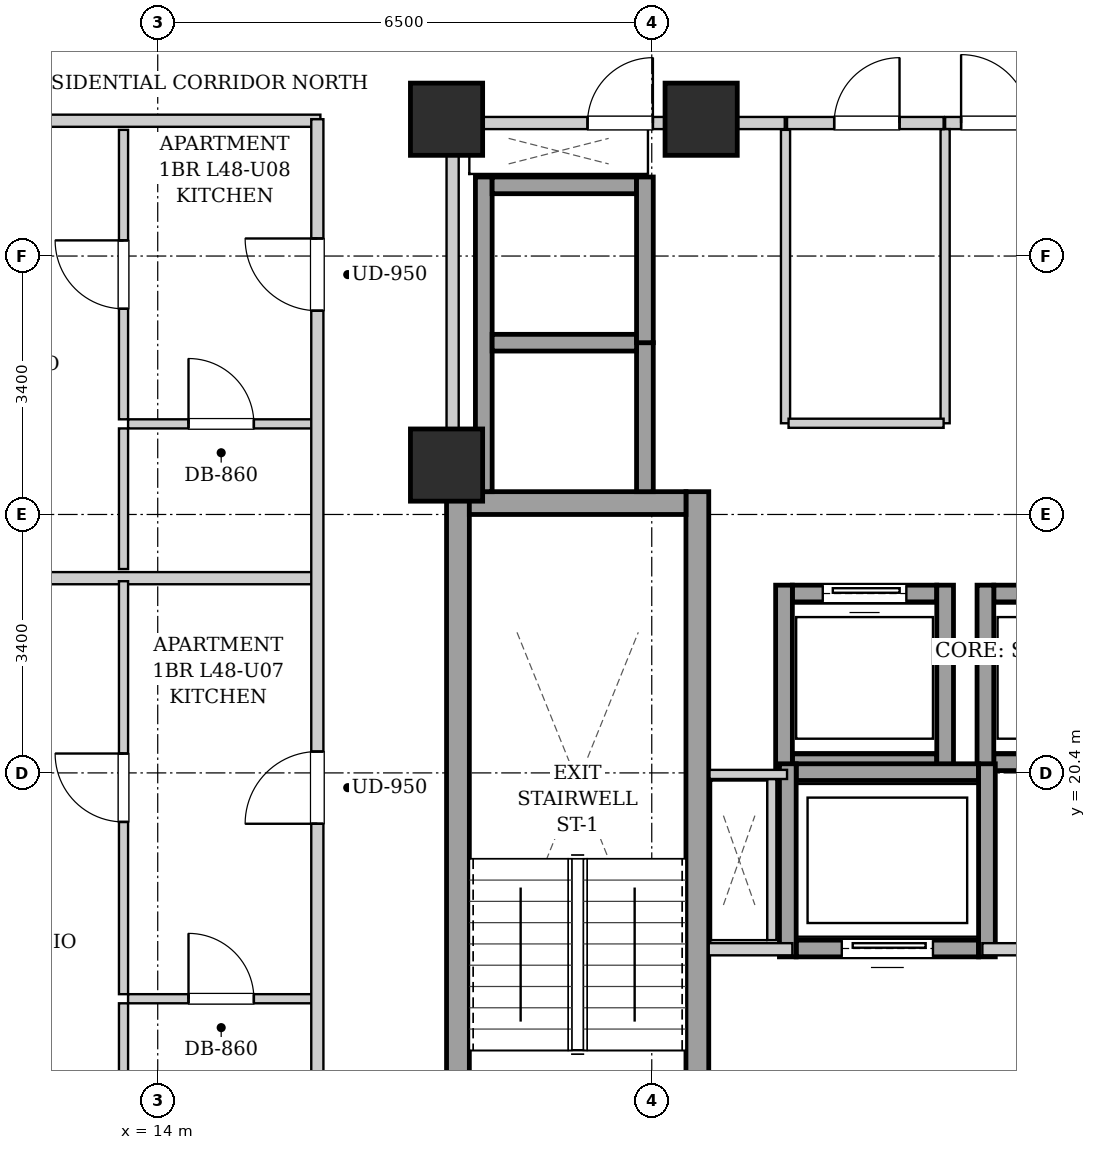
"""IFC4 building model, lengths in metres.
Left out: names, types, materials, properties, quantities, classifications, styles, units other than length and angle.
Written with IfcOpenShell. Run it as: python <this file> out.ifc"""

import sys

from ifc_helpers import new_model, si_unit, direction, frame, frame_2d, origin, origin_2d, place, context, subcontext, project, spatial, rectangle, extrude, element, fill, save


model = new_model("IFC4")
c1 = context("Model", 3, precision=1e-05, world=origin(), true_north=direction((0.0, 1.0)))
c2 = subcontext(c1, "Body", "Model", "MODEL_VIEW")
j1 = project(units=[si_unit("LENGTHUNIT", "METRE"), si_unit("PLANEANGLEUNIT", "RADIAN")], contexts=[c1])
p1 = place(None, origin())
s1 = spatial("IfcSite", under=j1, at=p1, CompositionType="ELEMENT")
p2 = place(p1, origin())
s2 = spatial("IfcBuilding", under=s1, at=p2, CompositionType="ELEMENT")
p3 = place(p2, frame((0.0, 0.0, 166.65)))
s3 = spatial("IfcBuildingStorey", under=s2, at=p3, CompositionType="ELEMENT", Elevation=166.65)
for number, where, z_axis, x_axis in (
    (1, (17.8, 29.0, 0.0), (0.0, 0.0, 1.0), (1.0, 0.0, 0.0)),
    (2, (21.15, 29.0, 0.0), (0.0, 0.0, 1.0), (1.0, 0.0, 0.0)),
    (3, (17.8, 24.45, 0.0), (0.0, 0.0, 1.0), (1.0, 0.0, 0.0)),
):
    element("IfcColumn", number, at=place(p3, frame(where, z_axis=z_axis, x_axis=x_axis)), inside=s3, PredefinedType="COLUMN", context=c2, shape_type="SweptSolid", body=[
        extrude(rectangle(XDim=0.95, YDim=0.95, at=origin_2d()), origin(), (0.0, 0.0, 1.0), 3.25),
    ])
for number, where, z_axis, x_axis in (
    (4, (17.95, 15.1, 0.0), (0.0, 0.0, 1.0), (0.0, 1.0, 0.0)),
    (5, (21.1, 15.1, 0.0), (0.0, 0.0, 1.0), (0.0, 1.0, 0.0)),
):
    element("IfcWall", number, at=place(p3, frame(where, z_axis=z_axis, x_axis=x_axis)), inside=s3, PredefinedType="SHEAR", context=c2, shape_type="SweptSolid", body=[
        extrude(rectangle(XDim=9.0, YDim=0.3, at=frame_2d((4.5, 0.0))), origin(), (0.0, 0.0, 1.0), 2.93),
    ])
p4 = place(p3, frame((18.1, 23.95, 0.0), z_axis=(0.0, 0.0, 1.0), x_axis=(1.0, 0.0, 0.0)))
e6 = element("IfcWall", 6, at=p4, inside=s3, PredefinedType="SHEAR", context=c2, shape_type="SweptSolid", body=[
    extrude(rectangle(XDim=2.85, YDim=0.3, at=frame_2d((1.425, 0.0))), origin(), (0.0, 0.0, 1.0), 2.93),
])
p5 = place(p3, frame((22.35, 20.54, 0.0), z_axis=(0.0, 0.0, 1.0), x_axis=(1.0, 0.0, 0.0)))
e7 = element("IfcWall", 7, at=p5, inside=s3, PredefinedType="SHEAR", context=c2, shape_type="SweptSolid", body=[
    extrude(rectangle(XDim=1.9, YDim=0.22, at=frame_2d((0.95, 0.0))), origin(), (0.0, 0.0, 1.0), 2.93),
])
p6 = place(p3, frame((22.35, 22.76, 0.0), z_axis=(0.0, 0.0, 1.0), x_axis=(1.0, 0.0, 0.0)))
e8 = element("IfcWall", 8, at=p6, inside=s3, PredefinedType="SHEAR", context=c2, shape_type="SweptSolid", body=[
    extrude(rectangle(XDim=1.9, YDim=0.22, at=frame_2d((0.95, 0.0))), origin(), (0.0, 0.0, 1.0), 2.93),
])
p7 = place(p6, frame((0.4, 0.0, 0.0)))
e9 = element("IfcOpeningElement", 9, at=p7, cuts=e8, PredefinedType="OPENING", context=c2, shape_type="SweptSolid", body=[
    extrude(rectangle(XDim=1.1, YDim=2.15, at=frame_2d((0.55, 1.075))), frame((0.0, 0.12, 0.0), z_axis=(0.0, -1.0, 0.0), x_axis=(1.0, 0.0, 0.0)), (0.0, 0.0, 1.0), 0.24),
])
for number, where, z_axis, x_axis in (
    (10, (22.24, 20.43, 0.0), (0.0, 0.0, 1.0), (0.0, 1.0, 0.0)),
    (11, (24.36, 20.43, 0.0), (0.0, 0.0, 1.0), (0.0, 1.0, 0.0)),
):
    element("IfcWall", number, at=place(p3, frame(where, z_axis=z_axis, x_axis=x_axis)), inside=s3, PredefinedType="SHEAR", context=c2, shape_type="SweptSolid", body=[
        extrude(rectangle(XDim=2.44, YDim=0.22, at=frame_2d((1.22, 0.0))), origin(), (0.0, 0.0, 1.0), 2.93),
    ])
p8 = place(p3, frame((25.0, 20.54, 0.0), z_axis=(0.0, 0.0, 1.0), x_axis=(1.0, 0.0, 0.0)))
e12 = element("IfcWall", 12, at=p8, inside=s3, PredefinedType="SHEAR", context=c2, shape_type="SweptSolid", body=[
    extrude(rectangle(XDim=1.9, YDim=0.22, at=frame_2d((0.95, 0.0))), origin(), (0.0, 0.0, 1.0), 2.93),
])
p9 = place(p3, frame((25.0, 22.76, 0.0), z_axis=(0.0, 0.0, 1.0), x_axis=(1.0, 0.0, 0.0)))
e13 = element("IfcWall", 13, at=p9, inside=s3, PredefinedType="SHEAR", context=c2, shape_type="SweptSolid", body=[
    extrude(rectangle(XDim=1.9, YDim=0.22, at=frame_2d((0.95, 0.0))), origin(), (0.0, 0.0, 1.0), 2.93),
])
p10 = place(p9, frame((0.4, 0.0, 0.0)))
e14 = element("IfcOpeningElement", 14, at=p10, cuts=e13, PredefinedType="OPENING", context=c2, shape_type="SweptSolid", body=[
    extrude(rectangle(XDim=1.1, YDim=2.15, at=frame_2d((0.55, 1.075))), frame((0.0, 0.12, 0.0), z_axis=(0.0, -1.0, 0.0), x_axis=(1.0, 0.0, 0.0)), (0.0, 0.0, 1.0), 0.24),
])
p11 = place(p3, frame((24.89, 20.43, 0.0), z_axis=(0.0, 0.0, 1.0), x_axis=(0.0, 1.0, 0.0)))
e15 = element("IfcWall", 15, at=p11, inside=s3, PredefinedType="SHEAR", context=c2, shape_type="SweptSolid", body=[
    extrude(rectangle(XDim=2.44, YDim=0.22, at=frame_2d((1.22, 0.0))), origin(), (0.0, 0.0, 1.0), 2.93),
])
p12 = place(p3, frame((18.29, 24.1, 0.0), z_axis=(0.0, 0.0, 1.0), x_axis=(0.0, 1.0, 0.0)))
e16 = element("IfcWall", 16, at=p12, inside=s3, PredefinedType="SHEAR", context=c2, shape_type="SweptSolid", body=[
    extrude(rectangle(XDim=4.14, YDim=0.22, at=frame_2d((2.07, 0.0))), origin(), (0.0, 0.0, 1.0), 2.93),
])
p13 = place(p3, frame((20.41, 24.1, 0.0), z_axis=(0.0, 0.0, 1.0), x_axis=(0.0, 1.0, 0.0)))
e17 = element("IfcWall", 17, at=p13, inside=s3, PredefinedType="SHEAR", context=c2, shape_type="SweptSolid", body=[
    extrude(rectangle(XDim=1.96, YDim=0.22, at=frame_2d((0.98, 0.0))), origin(), (0.0, 0.0, 1.0), 2.93),
])
for number, where, z_axis, x_axis in (
    (18, (18.4, 26.06, 0.0), (0.0, 0.0, 1.0), (1.0, 0.0, 0.0)),
    (19, (18.4, 28.13, 0.0), (0.0, 0.0, 1.0), (1.0, 0.0, 0.0)),
):
    element("IfcWall", number, at=place(p3, frame(where, z_axis=z_axis, x_axis=x_axis)), inside=s3, PredefinedType="SHEAR", context=c2, shape_type="SweptSolid", body=[
        extrude(rectangle(XDim=1.9, YDim=0.22, at=frame_2d((0.95, 0.0))), origin(), (0.0, 0.0, 1.0), 2.93),
    ])
p14 = place(p3, frame((20.41, 26.06, 0.0), z_axis=(0.0, 0.0, 1.0), x_axis=(0.0, 1.0, 0.0)))
e20 = element("IfcWall", 20, at=p14, inside=s3, PredefinedType="SHEAR", context=c2, shape_type="SweptSolid", body=[
    extrude(rectangle(XDim=2.18, YDim=0.22, at=frame_2d((1.09, 0.0))), origin(), (0.0, 0.0, 1.0), 2.93),
])
p15 = place(p3, frame((22.4, 18.09, 0.0), z_axis=(0.0, 0.0, 1.0), x_axis=(1.0, 0.0, 0.0)))
e21 = element("IfcWall", 21, at=p15, inside=s3, PredefinedType="SHEAR", context=c2, shape_type="SweptSolid", body=[
    extrude(rectangle(XDim=2.4, YDim=0.22, at=frame_2d((1.2, 0.0))), origin(), (0.0, 0.0, 1.0), 2.93),
])
p16 = place(p15, frame((0.6, 0.0, 0.0)))
e22 = element("IfcOpeningElement", 22, at=p16, cuts=e21, PredefinedType="OPENING", context=c2, shape_type="SweptSolid", body=[
    extrude(rectangle(XDim=1.2, YDim=2.15, at=frame_2d((0.6, 1.075))), frame((0.0, 0.12, 0.0), z_axis=(0.0, -1.0, 0.0), x_axis=(1.0, 0.0, 0.0)), (0.0, 0.0, 1.0), 0.24),
])
p17 = place(p3, frame((22.4, 20.41, 0.0), z_axis=(0.0, 0.0, 1.0), x_axis=(1.0, 0.0, 0.0)))
e23 = element("IfcWall", 23, at=p17, inside=s3, PredefinedType="SHEAR", context=c2, shape_type="SweptSolid", body=[
    extrude(rectangle(XDim=2.4, YDim=0.22, at=frame_2d((1.2, 0.0))), origin(), (0.0, 0.0, 1.0), 2.93),
])
for number, where, z_axis, x_axis in (
    (24, (22.29, 17.98, 0.0), (0.0, 0.0, 1.0), (0.0, 1.0, 0.0)),
    (25, (24.91, 17.98, 0.0), (0.0, 0.0, 1.0), (0.0, 1.0, 0.0)),
):
    element("IfcWall", number, at=place(p3, frame(where, z_axis=z_axis, x_axis=x_axis)), inside=s3, PredefinedType="SHEAR", context=c2, shape_type="SweptSolid", body=[
        extrude(rectangle(XDim=2.54, YDim=0.22, at=frame_2d((1.27, 0.0))), origin(), (0.0, 0.0, 1.0), 2.93),
    ])
p18 = place(p3, frame((21.25, 18.08, 0.0), z_axis=(0.0, 0.0, 1.0), x_axis=(1.0, 0.0, 0.0)))
e26 = element("IfcWall", 26, at=p18, inside=s3, PredefinedType="PARTITIONING", context=c2, shape_type="SweptSolid", body=[
    extrude(rectangle(XDim=1.1, YDim=0.16, at=frame_2d((0.55, 0.0))), origin(), (0.0, 0.0, 1.0), 2.93),
])
p19 = place(p3, frame((24.85, 18.08, 0.0), z_axis=(0.0, 0.0, 1.0), x_axis=(1.0, 0.0, 0.0)))
e27 = element("IfcWall", 27, at=p19, inside=s3, PredefinedType="PARTITIONING", context=c2, shape_type="SweptSolid", body=[
    extrude(rectangle(XDim=1.3, YDim=0.16, at=frame_2d((0.65, 0.0))), origin(), (0.0, 0.0, 1.0), 2.93),
])
p20 = place(p3, frame((17.88, 24.12, 0.0), z_axis=(0.0, 0.0, 1.0), x_axis=(0.0, 1.0, 0.0)))
e28 = element("IfcWall", 28, at=p20, inside=s3, PredefinedType="PARTITIONING", context=c2, shape_type="SweptSolid", body=[
    extrude(rectangle(XDim=4.76, YDim=0.16, at=frame_2d((2.38, 0.0))), origin(), (0.0, 0.0, 1.0), 2.265),
])
p21 = place(p3, frame((24.36, 28.95, 0.0), z_axis=(0.0, 0.0, 1.0), x_axis=(1.0, 0.0, 0.0)))
e29 = element("IfcWall", 29, at=p21, inside=s3, PredefinedType="PARTITIONING", context=c2, shape_type="SweptSolid", body=[
    extrude(rectangle(XDim=1.32, YDim=0.16, at=frame_2d((0.66, 0.0))), origin(), (0.0, 0.0, 1.0), 2.382),
])
p22 = place(p21, frame((0.21, 0.0, 0.0)))
e30 = element("IfcOpeningElement", 30, at=p22, cuts=e29, PredefinedType="OPENING", context=c2, shape_type="SweptSolid", body=[
    extrude(rectangle(XDim=0.9, YDim=2.05, at=frame_2d((0.45, 1.025))), frame((0.0, 0.09, 0.0), z_axis=(0.0, -1.0, 0.0), x_axis=(1.0, 0.0, 0.0)), (0.0, 0.0, 1.0), 0.18),
])
p23 = place(p3, frame((17.96, 28.95, 0.0), z_axis=(0.0, 0.0, 1.0), x_axis=(1.0, 0.0, 0.0)))
e31 = element("IfcWall", 31, at=p23, inside=s3, PredefinedType="PARTITIONING", context=c2, shape_type="SweptSolid", body=[
    extrude(rectangle(XDim=4.29, YDim=0.16, at=frame_2d((2.145, 0.0))), origin(), (0.0, 0.0, 1.0), 2.382),
])
p24 = place(p23, frame((1.695, 0.0, 0.0)))
e32 = element("IfcOpeningElement", 32, at=p24, cuts=e31, PredefinedType="OPENING", context=c2, shape_type="SweptSolid", body=[
    extrude(rectangle(XDim=0.86, YDim=2.05, at=frame_2d((0.43, 1.025))), frame((0.0, 0.09, 0.0), z_axis=(0.0, -1.0, 0.0), x_axis=(1.0, 0.0, 0.0)), (0.0, 0.0, 1.0), 0.18),
])
p25 = place(p3, frame((22.08, 18.2, 0.0), z_axis=(0.0, 0.0, 1.0), x_axis=(0.0, 1.0, 0.0)))
e33 = element("IfcWall", 33, at=p25, inside=s3, PredefinedType="PARTITIONING", context=c2, shape_type="SweptSolid", body=[
    extrude(rectangle(XDim=2.12, YDim=0.12, at=frame_2d((1.06, 0.0))), origin(), (0.0, 0.0, 1.0), 2.93),
])
p26 = place(p3, frame((22.28, 20.38, 0.0), z_axis=(0.0, 0.0, 1.0), x_axis=(-1.0, 0.0, 0.0)))
e34 = element("IfcWall", 34, at=p26, inside=s3, PredefinedType="PARTITIONING", context=c2, shape_type="SweptSolid", body=[
    extrude(rectangle(XDim=1.02, YDim=0.12, at=frame_2d((0.51, 0.0))), origin(), (0.0, 0.0, 1.0), 2.93),
])
p27 = place(p3, frame((24.36, 25.0, 0.0), z_axis=(0.0, 0.0, 1.0), x_axis=(0.0, 1.0, 0.0)))
e35 = element("IfcWall", 35, at=p27, inside=s3, PredefinedType="PARTITIONING", context=c2, shape_type="SweptSolid", body=[
    extrude(rectangle(XDim=3.87, YDim=0.12, at=frame_2d((1.935, 0.0))), origin(), (0.0, 0.0, 1.0), 2.93),
])
p28 = place(p3, frame((22.26, 25.0, 0.0), z_axis=(0.0, 0.0, 1.0), x_axis=(0.0, 1.0, 0.0)))
e36 = element("IfcWall", 36, at=p28, inside=s3, PredefinedType="PARTITIONING", context=c2, shape_type="SweptSolid", body=[
    extrude(rectangle(XDim=3.86, YDim=0.12, at=frame_2d((1.93, 0.0))), origin(), (0.0, 0.0, 1.0), 2.93),
])
p29 = place(p3, frame((22.3, 25.0, 0.0), z_axis=(0.0, 0.0, 1.0), x_axis=(1.0, 0.0, 0.0)))
e37 = element("IfcWall", 37, at=p29, inside=s3, PredefinedType="PARTITIONING", context=c2, shape_type="SweptSolid", body=[
    extrude(rectangle(XDim=2.04, YDim=0.12, at=frame_2d((1.02, 0.0))), origin(), (0.0, 0.0, 1.0), 2.93),
])
p30 = place(p3, frame((22.28, 28.95, 0.0), z_axis=(0.0, 0.0, 1.0), x_axis=(1.0, 0.0, 0.0)))
e38 = element("IfcWall", 38, at=p30, inside=s3, PredefinedType="PARTITIONING", context=c2, shape_type="SweptSolid", body=[
    extrude(rectangle(XDim=2.06, YDim=0.16, at=frame_2d((1.03, 0.0))), origin(), (0.0, 0.0, 1.0), 2.382),
])
p31 = place(p30, frame((0.62, 0.0, 0.0)))
e39 = element("IfcOpeningElement", 39, at=p31, cuts=e38, PredefinedType="OPENING", context=c2, shape_type="SweptSolid", body=[
    extrude(rectangle(XDim=0.86, YDim=2.05, at=frame_2d((0.43, 1.025))), frame((0.0, 0.09, 0.0), z_axis=(0.0, -1.0, 0.0), x_axis=(1.0, 0.0, 0.0)), (0.0, 0.0, 1.0), 0.18),
])
p32 = place(p3, frame((7.78, 28.98, 0.0), z_axis=(0.0, 0.0, 1.0), x_axis=(1.0, 0.0, 0.0)))
e40 = element("IfcWall", 40, at=p32, inside=s3, PredefinedType="PARTITIONING", context=c2, shape_type="SweptSolid", body=[
    extrude(rectangle(XDim=8.36, YDim=0.16, at=frame_2d((4.18, 0.0))), origin(), (0.0, 0.0, 1.0), 2.382),
])
p33 = place(p3, frame((7.78, 22.962, 0.0), z_axis=(0.0, 0.0, 1.0), x_axis=(1.0, 0.0, 0.0)))
e41 = element("IfcWall", 41, at=p33, inside=s3, PredefinedType="PARTITIONING", context=c2, shape_type="SweptSolid", body=[
    extrude(rectangle(XDim=8.28, YDim=0.16, at=frame_2d((4.14, 0.0))), origin(), (0.0, 0.0, 1.0), 2.93),
])
p34 = place(p3, frame((13.61, 17.429, 0.0), z_axis=(0.0, 0.0, 1.0), x_axis=(1.0, 0.0, 0.0)))
e42 = element("IfcWall", 42, at=p34, inside=s3, PredefinedType="PARTITIONING", context=c2, shape_type="SweptSolid", body=[
    extrude(rectangle(XDim=2.45, YDim=0.12, at=frame_2d((1.225, 0.0))), origin(), (0.0, 0.0, 1.0), 2.93),
])
p35 = place(p34, frame((0.795, 0.0, 0.0)))
e43 = element("IfcOpeningElement", 43, at=p35, cuts=e42, PredefinedType="OPENING", context=c2, shape_type="SweptSolid", body=[
    extrude(rectangle(XDim=0.86, YDim=2.05, at=frame_2d((0.43, 1.025))), frame((0.0, 0.07, 0.0), z_axis=(0.0, -1.0, 0.0), x_axis=(1.0, 0.0, 0.0)), (0.0, 0.0, 1.0), 0.14),
])
p36 = place(p3, frame((13.55, 15.21, 0.0), z_axis=(0.0, 0.0, 1.0), x_axis=(0.0, 1.0, 0.0)))
e44 = element("IfcWall", 44, at=p36, inside=s3, PredefinedType="PARTITIONING", context=c2, shape_type="SweptSolid", body=[
    extrude(rectangle(XDim=2.159, YDim=0.12, at=frame_2d((1.08, 0.0))), origin(), (0.0, 0.0, 1.0), 2.93),
])
p37 = place(p3, frame((13.55, 17.489, 0.0), z_axis=(0.0, 0.0, 1.0), x_axis=(0.0, 1.0, 0.0)))
e45 = element("IfcWall", 45, at=p37, inside=s3, PredefinedType="PARTITIONING", context=c2, shape_type="SweptSolid", body=[
    extrude(rectangle(XDim=5.433, YDim=0.12, at=frame_2d((2.717, 0.0))), origin(), (0.0, 0.0, 1.0), 2.93),
])
p38 = place(p37, frame((2.266, 0.0, 0.0)))
e46 = element("IfcOpeningElement", 46, at=p38, cuts=e45, PredefinedType="OPENING", context=c2, shape_type="SweptSolid", body=[
    extrude(rectangle(XDim=0.9, YDim=2.05, at=frame_2d((0.45, 1.025))), frame((0.0, 0.07, 0.0), z_axis=(0.0, -1.0, 0.0), x_axis=(1.0, 0.0, 0.0)), (0.0, 0.0, 1.0), 0.14),
])
p39 = place(p3, frame((13.61, 24.992, 0.0), z_axis=(0.0, 0.0, 1.0), x_axis=(1.0, 0.0, 0.0)))
e47 = element("IfcWall", 47, at=p39, inside=s3, PredefinedType="PARTITIONING", context=c2, shape_type="SweptSolid", body=[
    extrude(rectangle(XDim=2.45, YDim=0.12, at=frame_2d((1.225, 0.0))), origin(), (0.0, 0.0, 1.0), 2.93),
])
p40 = place(p39, frame((0.795, 0.0, 0.0)))
e48 = element("IfcOpeningElement", 48, at=p40, cuts=e47, PredefinedType="OPENING", context=c2, shape_type="SweptSolid", body=[
    extrude(rectangle(XDim=0.86, YDim=2.05, at=frame_2d((0.43, 1.025))), frame((0.0, 0.07, 0.0), z_axis=(0.0, -1.0, 0.0), x_axis=(1.0, 0.0, 0.0)), (0.0, 0.0, 1.0), 0.14),
])
p41 = place(p3, frame((13.55, 23.082, 0.0), z_axis=(0.0, 0.0, 1.0), x_axis=(0.0, 1.0, 0.0)))
e49 = element("IfcWall", 49, at=p41, inside=s3, PredefinedType="PARTITIONING", context=c2, shape_type="SweptSolid", body=[
    extrude(rectangle(XDim=1.85, YDim=0.12, at=frame_2d((0.925, 0.0))), origin(), (0.0, 0.0, 1.0), 2.93),
])
p42 = place(p3, frame((13.55, 25.052, 0.0), z_axis=(0.0, 0.0, 1.0), x_axis=(0.0, 1.0, 0.0)))
e50 = element("IfcWall", 50, at=p42, inside=s3, PredefinedType="PARTITIONING", context=c2, shape_type="SweptSolid", body=[
    extrude(rectangle(XDim=3.808, YDim=0.12, at=frame_2d((1.904, 0.0))), origin(), (0.0, 0.0, 1.0), 2.93),
])
p43 = place(p42, frame((1.454, 0.0, 0.0)))
e51 = element("IfcOpeningElement", 51, at=p43, cuts=e50, PredefinedType="OPENING", context=c2, shape_type="SweptSolid", body=[
    extrude(rectangle(XDim=0.9, YDim=2.05, at=frame_2d((0.45, 1.025))), frame((0.0, 0.07, 0.0), z_axis=(0.0, -1.0, 0.0), x_axis=(1.0, 0.0, 0.0)), (0.0, 0.0, 1.0), 0.14),
])
p44 = place(p3, frame((16.1, 15.07, 0.0), z_axis=(0.0, 0.0, 1.0), x_axis=(0.0, 1.0, 0.0)))
e52 = element("IfcWall", 52, at=p44, inside=s3, PredefinedType="PARTITIONING", context=c2, shape_type="SweptSolid", body=[
    extrude(rectangle(XDim=13.93, YDim=0.16, at=frame_2d((6.965, 0.0))), origin(), (0.0, 0.0, 1.0), 2.93),
])
p45 = place(p44, frame((4.661, 0.0, 0.0)))
e53 = element("IfcOpeningElement", 53, at=p45, cuts=e52, PredefinedType="OPENING", context=c2, shape_type="SweptSolid", body=[
    extrude(rectangle(XDim=0.95, YDim=2.1, at=frame_2d((0.475, 1.05))), frame((0.0, 0.09, 0.0), z_axis=(0.0, -1.0, 0.0), x_axis=(1.0, 0.0, 0.0)), (0.0, 0.0, 1.0), 0.18),
])
p46 = place(p44, frame((11.411, 0.0, 0.0)))
e54 = element("IfcOpeningElement", 54, at=p46, cuts=e52, PredefinedType="OPENING", context=c2, shape_type="SweptSolid", body=[
    extrude(rectangle(XDim=0.95, YDim=2.1, at=frame_2d((0.475, 1.05))), frame((0.0, 0.09, 0.0), z_axis=(0.0, -1.0, 0.0), x_axis=(1.0, 0.0, 0.0)), (0.0, 0.0, 1.0), 0.18),
])
p47 = place(p7, origin())
e55 = element("IfcDoor", 55, at=p47, inside=s3, OperationType="SLIDING_TO_LEFT", PredefinedType="DOOR", context=c2, shape_type="SweptSolid", body=[
    extrude(rectangle(XDim=1.1, YDim=2.15, at=frame_2d((0.55, 1.075))), frame((0.0, 0.025, 0.0), z_axis=(0.0, -1.0, 0.0), x_axis=(1.0, 0.0, 0.0)), (0.0, 0.0, 1.0), 0.05),
])
fill(e9, e55)
p48 = place(p16, origin())
e56 = element("IfcDoor", 56, at=p48, inside=s3, OperationType="SLIDING_TO_LEFT", PredefinedType="DOOR", context=c2, shape_type="SweptSolid", body=[
    extrude(rectangle(XDim=1.2, YDim=2.15, at=frame_2d((0.6, 1.075))), frame((0.0, 0.025, 0.0), z_axis=(0.0, -1.0, 0.0), x_axis=(1.0, 0.0, 0.0)), (0.0, 0.0, 1.0), 0.05),
])
fill(e22, e56)
p49 = place(p22, origin())
e57 = element("IfcDoor", 57, at=p49, inside=s3, OperationType="SINGLE_SWING_LEFT", PredefinedType="DOOR", context=c2, shape_type="SweptSolid", body=[
    extrude(rectangle(XDim=0.9, YDim=2.05, at=frame_2d((0.45, 1.025))), frame((0.0, 0.025, 0.0), z_axis=(0.0, -1.0, 0.0), x_axis=(1.0, 0.0, 0.0)), (0.0, 0.0, 1.0), 0.05),
])
fill(e30, e57)
p50 = place(p24, origin())
e58 = element("IfcDoor", 58, at=p50, inside=s3, OperationType="SINGLE_SWING_RIGHT", PredefinedType="DOOR", context=c2, shape_type="SweptSolid", body=[
    extrude(rectangle(XDim=0.86, YDim=2.05, at=frame_2d((0.43, 1.025))), frame((0.0, 0.025, 0.0), z_axis=(0.0, -1.0, 0.0), x_axis=(1.0, 0.0, 0.0)), (0.0, 0.0, 1.0), 0.05),
])
fill(e32, e58)
p51 = place(p31, origin())
e59 = element("IfcDoor", 59, at=p51, inside=s3, OperationType="SINGLE_SWING_RIGHT", PredefinedType="DOOR", context=c2, shape_type="SweptSolid", body=[
    extrude(rectangle(XDim=0.86, YDim=2.05, at=frame_2d((0.43, 1.025))), frame((0.0, 0.025, 0.0), z_axis=(0.0, -1.0, 0.0), x_axis=(1.0, 0.0, 0.0)), (0.0, 0.0, 1.0), 0.05),
])
fill(e39, e59)
p52 = place(p35, origin())
e60 = element("IfcDoor", 60, at=p52, inside=s3, OperationType="SINGLE_SWING_LEFT", PredefinedType="DOOR", context=c2, shape_type="SweptSolid", body=[
    extrude(rectangle(XDim=0.86, YDim=2.05, at=frame_2d((0.43, 1.025))), frame((0.0, 0.025, 0.0), z_axis=(0.0, -1.0, 0.0), x_axis=(1.0, 0.0, 0.0)), (0.0, 0.0, 1.0), 0.05),
])
fill(e43, e60)
p53 = place(p38, origin())
e61 = element("IfcDoor", 61, at=p53, inside=s3, OperationType="SINGLE_SWING_RIGHT", PredefinedType="DOOR", context=c2, shape_type="SweptSolid", body=[
    extrude(rectangle(XDim=0.9, YDim=2.05, at=frame_2d((0.45, 1.025))), frame((0.0, 0.025, 0.0), z_axis=(0.0, -1.0, 0.0), x_axis=(1.0, 0.0, 0.0)), (0.0, 0.0, 1.0), 0.05),
])
fill(e46, e61)
p54 = place(p40, origin())
e62 = element("IfcDoor", 62, at=p54, inside=s3, OperationType="SINGLE_SWING_LEFT", PredefinedType="DOOR", context=c2, shape_type="SweptSolid", body=[
    extrude(rectangle(XDim=0.86, YDim=2.05, at=frame_2d((0.43, 1.025))), frame((0.0, 0.025, 0.0), z_axis=(0.0, -1.0, 0.0), x_axis=(1.0, 0.0, 0.0)), (0.0, 0.0, 1.0), 0.05),
])
fill(e48, e62)
p55 = place(p43, origin())
e63 = element("IfcDoor", 63, at=p55, inside=s3, OperationType="SINGLE_SWING_RIGHT", PredefinedType="DOOR", context=c2, shape_type="SweptSolid", body=[
    extrude(rectangle(XDim=0.9, YDim=2.05, at=frame_2d((0.45, 1.025))), frame((0.0, 0.025, 0.0), z_axis=(0.0, -1.0, 0.0), x_axis=(1.0, 0.0, 0.0)), (0.0, 0.0, 1.0), 0.05),
])
fill(e51, e63)
p56 = place(p45, origin())
e64 = element("IfcDoor", 64, at=p56, inside=s3, OperationType="SINGLE_SWING_LEFT", PredefinedType="DOOR", context=c2, shape_type="SweptSolid", body=[
    extrude(rectangle(XDim=0.95, YDim=2.1, at=frame_2d((0.475, 1.05))), frame((0.0, 0.025, 0.0), z_axis=(0.0, -1.0, 0.0), x_axis=(1.0, 0.0, 0.0)), (0.0, 0.0, 1.0), 0.05),
])
fill(e53, e64)
p57 = place(p46, origin())
e65 = element("IfcDoor", 65, at=p57, inside=s3, OperationType="SINGLE_SWING_RIGHT", PredefinedType="DOOR", context=c2, shape_type="SweptSolid", body=[
    extrude(rectangle(XDim=0.95, YDim=2.1, at=frame_2d((0.475, 1.05))), frame((0.0, 0.025, 0.0), z_axis=(0.0, -1.0, 0.0), x_axis=(1.0, 0.0, 0.0)), (0.0, 0.0, 1.0), 0.05),
])
fill(e54, e65)
save(model, sys.argv[1])
